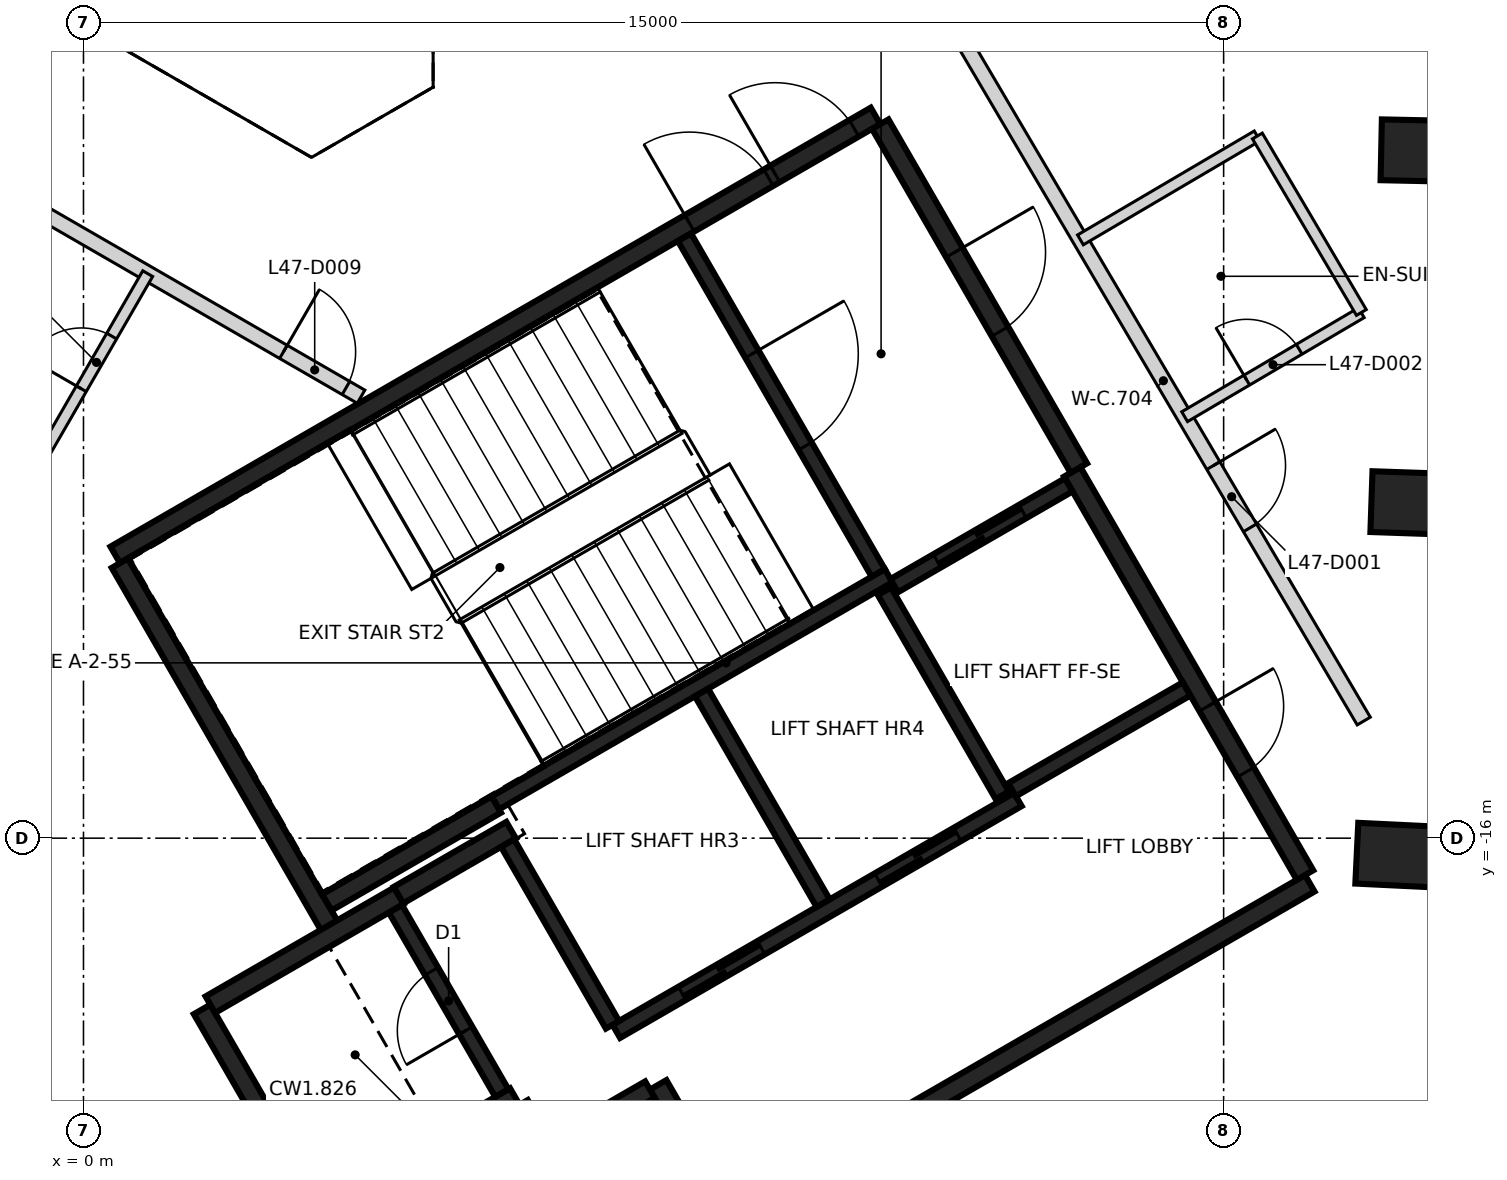
"""IFC4 building model, lengths in metres.
Left out: names, types, materials, properties, quantities, classifications, styles, units other than length and angle.
Written with IfcOpenShell. Run it as: python <this file> out.ifc"""

import sys

from ifc_helpers import new_model, si_unit, direction, frame, frame_2d, origin, origin_2d, place, context, subcontext, project, spatial, rectangle, extrude, element, fill, save


model = new_model("IFC4")
c1 = context("Model", 3, precision=1e-05, world=origin(), true_north=direction((0.0, 1.0)))
c2 = subcontext(c1, "Body", "Model", "MODEL_VIEW")
j1 = project(units=[si_unit("LENGTHUNIT", "METRE"), si_unit("PLANEANGLEUNIT", "RADIAN")], contexts=[c1])
p1 = place(None, origin())
s1 = spatial("IfcSite", under=j1, at=p1, CompositionType="ELEMENT")
p2 = place(p1, origin())
s2 = spatial("IfcBuilding", under=s1, at=p2, CompositionType="ELEMENT")
p3 = place(p2, frame((0.0, 0.0, 190.0)))
s3 = spatial("IfcBuildingStorey", under=s2, at=p3, CompositionType="ELEMENT", Elevation=190.0)
for number, where, z_axis, x_axis in (
    (1, (17.326, -16.226, -0.35), (0.0, 0.0, 1.0), (-0.999, 0.048, 0.0)),
    (2, (17.519, -11.592, -0.35), (0.0, 0.0, 1.0), (-0.999, 0.034, 0.0)),
    (3, (17.648, -6.956, -0.35), (0.0, 0.0, 1.0), (-1.0, 0.021, 0.0)),
):
    element("IfcColumn", number, at=place(p3, frame(where, z_axis=z_axis, x_axis=x_axis)), inside=s3, PredefinedType="COLUMN", context=c2, shape_type="SweptSolid", body=[
        extrude(rectangle(XDim=1.15, YDim=0.8, at=origin_2d()), origin(), (0.0, 0.0, 1.0), 3.6),
    ])
p4 = place(p3, frame((0.417, -12.273, 0.0), z_axis=(0.0, 0.0, 1.0), x_axis=(0.866021906294, 0.500006057782, 0.0)))
e4 = element("IfcWall", 4, at=p4, inside=s3, PredefinedType="SHEAR", context=c2, shape_type="SweptSolid", body=[
    extrude(rectangle(XDim=11.55, YDim=0.25, at=frame_2d((5.775, 0.0))), origin(), (0.0, 0.0, 1.0), 3.25),
])
p5 = place(p4, frame((10.025, 0.0, 0.0)))
e5 = element("IfcOpeningElement", 5, at=p5, cuts=e4, PredefinedType="OPENING", context=c2, shape_type="SweptSolid", body=[
    extrude(rectangle(XDim=1.2, YDim=2.1, at=frame_2d((0.6, 1.05))), frame((0.0, 0.135, 0.0), z_axis=(0.0, -1.0, 0.0), x_axis=(1.0, 0.0, 0.0)), (0.0, 0.0, 1.0), 0.27),
])
p6 = place(p4, frame((8.725, 0.0, 0.0)))
e6 = element("IfcOpeningElement", 6, at=p6, cuts=e4, PredefinedType="OPENING", context=c2, shape_type="SweptSolid", body=[
    extrude(rectangle(XDim=1.2, YDim=2.1, at=frame_2d((0.6, 1.05))), frame((0.0, 0.135, 0.0), z_axis=(0.0, -1.0, 0.0), x_axis=(1.0, 0.0, 0.0)), (0.0, 0.0, 1.0), 0.27),
])
p7 = place(p3, frame((16.133, -16.594, 0.0), z_axis=(0.0, 0.0, 1.0), x_axis=(-0.866022959057, -0.500004234368, 0.0)))
e7 = element("IfcWall", 7, at=p7, inside=s3, PredefinedType="SHEAR", context=c2, shape_type="SweptSolid", body=[
    extrude(rectangle(XDim=8.75, YDim=0.25, at=frame_2d((4.375, 0.0))), origin(), (0.0, 0.0, 1.0), 3.25),
])
p8 = place(p3, frame((13.008, -11.181, 0.0), z_axis=(0.0, 0.0, 1.0), x_axis=(0.500001955336, -0.866024274868, 0.0)))
e8 = element("IfcWall", 8, at=p8, inside=s3, PredefinedType="SHEAR", context=c2, shape_type="SweptSolid", body=[
    extrude(rectangle(XDim=6.125, YDim=0.25, at=frame_2d((3.062, 0.0))), origin(), (0.0, 0.0, 1.0), 3.25),
])
p9 = place(p8, frame((3.563, 0.0, 0.0)))
e9 = element("IfcOpeningElement", 9, at=p9, cuts=e8, PredefinedType="OPENING", context=c2, shape_type="SweptSolid", body=[
    extrude(rectangle(XDim=1.0, YDim=2.1, at=frame_2d((0.5, 1.05))), frame((0.0, 0.135, 0.0), z_axis=(0.0, -1.0, 0.0), x_axis=(1.0, 0.0, 0.0)), (0.0, 0.0, 1.0), 0.27),
])
p10 = place(p3, frame((3.235, -17.153, 0.0), z_axis=(0.0, 0.0, 1.0), x_axis=(-0.500008851346, 0.866020293397, 0.0)))
e10 = element("IfcWall", 10, at=p10, inside=s3, PredefinedType="SHEAR", context=c2, shape_type="SweptSolid", body=[
    extrude(rectangle(XDim=5.51, YDim=0.25, at=frame_2d((2.755, 0.0))), origin(), (0.0, 0.0, 1.0), 3.25),
])
p11 = place(p3, frame((10.483, -6.606, 0.0), z_axis=(0.0, 0.0, 1.0), x_axis=(0.49999885962, -0.866026062182, 0.0)))
e11 = element("IfcWall", 11, at=p11, inside=s3, PredefinedType="SHEAR", context=c2, shape_type="SweptSolid", body=[
    extrude(rectangle(XDim=5.225, YDim=0.25, at=frame_2d((2.612, 0.0))), origin(), (0.0, 0.0, 1.0), 3.25),
])
p12 = place(p11, frame((1.95, 0.0, 0.0)))
e12 = element("IfcOpeningElement", 12, at=p12, cuts=e11, PredefinedType="OPENING", context=c2, shape_type="SweptSolid", body=[
    extrude(rectangle(XDim=1.2, YDim=2.1, at=frame_2d((0.6, 1.05))), frame((0.0, 0.135, 0.0), z_axis=(0.0, -1.0, 0.0), x_axis=(1.0, 0.0, 0.0)), (0.0, 0.0, 1.0), 0.27),
])
p13 = place(p3, frame((3.085, -20.894, 0.0), z_axis=(0.0, 0.0, 1.0), x_axis=(-0.499978833458, 0.866037623948, 0.0)))
e13 = element("IfcWall", 13, at=p13, inside=s3, PredefinedType="SHEAR", context=c2, shape_type="SweptSolid", body=[
    extrude(rectangle(XDim=3.05, YDim=0.25, at=frame_2d((1.525, 0.0))), origin(), (0.0, 0.0, 1.0), 3.25),
])
p14 = place(p3, frame((1.669, -18.19, 0.0), z_axis=(0.0, 0.0, 1.0), x_axis=(0.866042235819, 0.499970844928, 0.0)))
e14 = element("IfcWall", 14, at=p14, inside=s3, PredefinedType="SHEAR", context=c2, shape_type="SweptSolid", body=[
    extrude(rectangle(XDim=2.865, YDim=0.25, at=frame_2d((1.432, 0.0))), origin(), (0.0, 0.0, 1.0), 3.25),
])
p15 = place(p3, frame((5.675, -19.399, 0.0), z_axis=(0.0, 0.0, 1.0), x_axis=(-0.866026637627, -0.499997862916, 0.0)))
e15 = element("IfcWall", 15, at=p15, inside=s3, PredefinedType="SHEAR", context=c2, shape_type="SweptSolid", body=[
    extrude(rectangle(XDim=2.865, YDim=0.25, at=frame_2d((1.432, 0.0))), origin(), (0.0, 0.0, 1.0), 3.25),
])
p16 = place(p3, frame((5.431, -15.556, 0.0), z_axis=(0.0, 0.0, 1.0), x_axis=(-0.866022940537, -0.500004266446, 0.0)))
e16 = element("IfcWall", 16, at=p16, inside=s3, PredefinedType="SHEAR", context=c2, shape_type="SweptSolid", body=[
    extrude(rectangle(XDim=2.575, YDim=0.25, at=frame_2d((1.287, 0.0))), origin(), (0.0, 0.0, 1.0), 3.25),
])
p17 = place(p3, frame((8.493, -20.86, 0.0), z_axis=(0.0, 0.0, 1.0), x_axis=(-0.500039802285, 0.866002422705, 0.0)))
e17 = element("IfcWall", 17, at=p17, inside=s3, PredefinedType="SHEAR", context=c2, shape_type="SweptSolid", body=[
    extrude(rectangle(XDim=1.865, YDim=0.25, at=frame_2d((0.932, 0.0))), origin(), (0.0, 0.0, 1.0), 3.25),
])
p18 = place(p3, frame((4.145, -16.749, 0.0), z_axis=(0.0, 0.0, 1.0), x_axis=(0.866038183914, 0.499977863513, 0.0)))
e18 = element("IfcWall", 18, at=p18, inside=s3, PredefinedType="SHEAR", context=c2, shape_type="SweptSolid", body=[
    extrude(rectangle(XDim=1.71, YDim=0.25, at=frame_2d((0.855, 0.0))), origin(), (0.0, 0.0, 1.0), 3.25),
])
p19 = place(p3, frame((7.452, -19.308, 0.0), z_axis=(0.0, 0.0, 1.0), x_axis=(-0.866044474677, -0.49996696679, 0.0)))
e19 = element("IfcWall", 19, at=p19, inside=s3, PredefinedType="SHEAR", context=c2, shape_type="SweptSolid", body=[
    extrude(rectangle(XDim=1.584, YDim=0.25, at=frame_2d((0.792, 0.0))), origin(), (0.0, 0.0, 1.0), 3.25),
])
p20 = place(p3, frame((6.017, -19.992, 0.0), z_axis=(0.0, 0.0, 1.0), x_axis=(-0.500364886717, 0.865814633822, 0.0)))
e20 = element("IfcWall", 20, at=p20, inside=s3, PredefinedType="SHEAR", context=c2, shape_type="SweptSolid", body=[
    extrude(rectangle(XDim=0.559, YDim=0.25, at=frame_2d((0.28, 0.0))), origin(), (0.0, 0.0, 1.0), 3.25),
])
p21 = place(p3, frame((5.419, -15.534, 0.0), z_axis=(0.0, 0.0, 1.0), x_axis=(0.866029065029, 0.499993658486, 0.0)))
e21 = element("IfcWall", 21, at=p21, inside=s3, PredefinedType="SHEAR", context=c2, shape_type="SweptSolid", body=[
    extrude(rectangle(XDim=5.974, YDim=0.2, at=frame_2d((2.987, 0.0))), origin(), (0.0, 0.0, 1.0), 3.25),
])
p22 = place(p3, frame((7.01, -18.542, 0.0), z_axis=(0.0, 0.0, 1.0), x_axis=(0.866030299012, 0.499991521122, 0.0)))
e22 = element("IfcWall", 22, at=p22, inside=s3, PredefinedType="SHEAR", context=c2, shape_type="SweptSolid", body=[
    extrude(rectangle(XDim=6.1, YDim=0.2, at=frame_2d((3.05, 0.0))), origin(), (0.0, 0.0, 1.0), 3.25),
])
p23 = place(p22, frame((1.0, 0.0, 0.0)))
e23 = element("IfcOpeningElement", 23, at=p23, cuts=e22, PredefinedType="OPENING", context=c2, shape_type="SweptSolid", body=[
    extrude(rectangle(XDim=1.2, YDim=2.1, at=frame_2d((0.6, 1.05))), frame((0.0, 0.11, 0.0), z_axis=(0.0, -1.0, 0.0), x_axis=(1.0, 0.0, 0.0)), (0.0, 0.0, 1.0), 0.22),
])
p24 = place(p22, frame((3.982, 0.0, 0.0)))
e24 = element("IfcOpeningElement", 24, at=p24, cuts=e22, PredefinedType="OPENING", context=c2, shape_type="SweptSolid", body=[
    extrude(rectangle(XDim=1.2, YDim=2.1, at=frame_2d((0.6, 1.05))), frame((0.0, 0.11, 0.0), z_axis=(0.0, -1.0, 0.0), x_axis=(1.0, 0.0, 0.0)), (0.0, 0.0, 1.0), 0.22),
])
p25 = place(p3, frame((7.906, -8.094, 0.0), z_axis=(0.0, 0.0, 1.0), x_axis=(0.500027839223, -0.866009330205, 0.0)))
e25 = element("IfcWall", 25, at=p25, inside=s3, PredefinedType="SHEAR", context=c2, shape_type="SweptSolid", body=[
    extrude(rectangle(XDim=5.098, YDim=0.2, at=frame_2d((2.549, 0.0))), origin(), (0.0, 0.0, 1.0), 3.25),
])
p26 = place(p25, frame((1.774, 0.0, 0.0)))
e26 = element("IfcOpeningElement", 26, at=p26, cuts=e25, PredefinedType="OPENING", context=c2, shape_type="SweptSolid", body=[
    extrude(rectangle(XDim=1.4, YDim=2.1, at=frame_2d((0.7, 1.05))), frame((0.0, 0.11, 0.0), z_axis=(0.0, -1.0, 0.0), x_axis=(1.0, 0.0, 0.0)), (0.0, 0.0, 1.0), 0.22),
])
p27 = place(p3, frame((8.132, -14.084, 0.0), z_axis=(0.0, 0.0, 1.0), x_axis=(0.499997778408, -0.866026686418, 0.0)))
e27 = element("IfcWall", 27, at=p27, inside=s3, PredefinedType="SHEAR", context=c2, shape_type="SweptSolid", body=[
    extrude(rectangle(XDim=3.198, YDim=0.2, at=frame_2d((1.599, 0.0))), origin(), (0.0, 0.0, 1.0), 3.25),
])
p28 = place(p3, frame((5.503, -19.352, 0.0), z_axis=(0.0, 0.0, 1.0), x_axis=(-0.499986818241, 0.866033014143, 0.0)))
e28 = element("IfcWall", 28, at=p28, inside=s3, PredefinedType="SHEAR", context=c2, shape_type="SweptSolid", body=[
    extrude(rectangle(XDim=2.798, YDim=0.2, at=frame_2d((1.399, 0.0))), origin(), (0.0, 0.0, 1.0), 3.25),
])
p29 = place(p28, frame((0.949, 0.0, 0.0)))
e29 = element("IfcOpeningElement", 29, at=p29, cuts=e28, PredefinedType="OPENING", context=c2, shape_type="SweptSolid", body=[
    extrude(rectangle(XDim=0.9, YDim=2.1, at=frame_2d((0.45, 1.05))), frame((0.0, 0.11, 0.0), z_axis=(0.0, -1.0, 0.0), x_axis=(1.0, 0.0, 0.0)), (0.0, 0.0, 1.0), 0.22),
])
p30 = place(p3, frame((6.96, -18.455, 0.0), z_axis=(0.0, 0.0, 1.0), x_axis=(-0.499926705758, 0.866067716099, 0.0)))
e30 = element("IfcWall", 30, at=p30, inside=s3, PredefinedType="SHEAR", context=c2, shape_type="SweptSolid", body=[
    extrude(rectangle(XDim=2.759, YDim=0.2, at=frame_2d((1.38, 0.0))), origin(), (0.0, 0.0, 1.0), 3.25),
])
p31 = place(p3, frame((12.088, -15.437, 0.0), z_axis=(0.0, 0.0, 1.0), x_axis=(-0.500026960575, 0.86600983753, 0.0)))
e31 = element("IfcWall", 31, at=p31, inside=s3, PredefinedType="SHEAR", context=c2, shape_type="SweptSolid", body=[
    extrude(rectangle(XDim=3.1, YDim=0.2, at=frame_2d((1.55, 0.0))), origin(), (0.0, 0.0, 1.0), 3.25),
])
p32 = place(p3, frame((10.666, -12.678, 0.0), z_axis=(0.0, 0.0, 1.0), x_axis=(0.866018407898, 0.500012117035, 0.0)))
e32 = element("IfcWall", 32, at=p32, inside=s3, PredefinedType="SHEAR", context=c2, shape_type="SweptSolid", body=[
    extrude(rectangle(XDim=2.651, YDim=0.2, at=frame_2d((1.325, 0.0))), origin(), (0.0, 0.0, 1.0), 3.25),
])
p33 = place(p32, frame((0.652, 0.0, 0.0)))
e33 = element("IfcOpeningElement", 33, at=p33, cuts=e32, PredefinedType="OPENING", context=c2, shape_type="SweptSolid", body=[
    extrude(rectangle(XDim=1.3, YDim=2.1, at=frame_2d((0.65, 1.05))), frame((0.0, 0.11, 0.0), z_axis=(0.0, -1.0, 0.0), x_axis=(1.0, 0.0, 0.0)), (0.0, 0.0, 1.0), 0.22),
])
p34 = place(p3, frame((14.512, -14.037, 0.0), z_axis=(0.0, 0.0, 1.0), x_axis=(-0.866018407898, -0.500012117035, 0.0)))
e34 = element("IfcWall", 34, at=p34, inside=s3, PredefinedType="SHEAR", context=c2, shape_type="SweptSolid", body=[
    extrude(rectangle(XDim=2.651, YDim=0.2, at=frame_2d((1.325, 0.0))), origin(), (0.0, 0.0, 1.0), 3.25),
])
p35 = place(p3, frame((-7.589, -3.702, 0.0), z_axis=(0.0, 0.0, 1.0), x_axis=(0.86602490244, -0.500000868353, 0.0)))
e35 = element("IfcWall", 35, at=p35, inside=s3, PredefinedType="PARTITIONING", context=c2, shape_type="SweptSolid", body=[
    extrude(rectangle(XDim=12.98, YDim=0.2, at=frame_2d((6.49, 0.0))), origin(), (0.0, 0.0, 1.0), 3.25),
])
p36 = place(p35, frame((11.8, 0.0, 0.0)))
e36 = element("IfcOpeningElement", 36, at=p36, cuts=e35, PredefinedType="OPENING", context=c2, shape_type="SweptSolid", body=[
    extrude(rectangle(XDim=0.95, YDim=2.1, at=frame_2d((0.475, 1.05))), frame((0.0, 0.11, 0.0), z_axis=(0.0, -1.0, 0.0), x_axis=(1.0, 0.0, 0.0)), (0.0, 0.0, 1.0), 0.22),
])
p37 = place(p3, frame((11.571, -5.505, 0.0), z_axis=(0.0, 0.0, 1.0), x_axis=(0.507402039651, -0.861709446483, 0.0)))
e37 = element("IfcWall", 37, at=p37, inside=s3, PredefinedType="PARTITIONING", context=c2, shape_type="SweptSolid", body=[
    extrude(rectangle(XDim=10.391, YDim=0.2, at=frame_2d((5.196, 0.0))), origin(), (0.0, 0.0, 1.0), 3.25),
])
p38 = place(p37, frame((6.491, 0.0, 0.0)))
e38 = element("IfcOpeningElement", 38, at=p38, cuts=e37, PredefinedType="OPENING", context=c2, shape_type="SweptSolid", body=[
    extrude(rectangle(XDim=0.95, YDim=2.1, at=frame_2d((0.475, 1.05))), frame((0.0, 0.11, 0.0), z_axis=(0.0, -1.0, 0.0), x_axis=(1.0, 0.0, 0.0)), (0.0, 0.0, 1.0), 0.22),
])
p39 = place(p3, frame((-0.502, -10.908, 0.0), z_axis=(0.0, 0.0, 1.0), x_axis=(0.499675408556, 0.866212725654, 0.0)))
e39 = element("IfcWall", 39, at=p39, inside=s3, PredefinedType="PARTITIONING", context=c2, shape_type="SweptSolid", body=[
    extrude(rectangle(XDim=2.696, YDim=0.15, at=frame_2d((1.348, 0.0))), origin(), (0.0, 0.0, 1.0), 3.25),
])
p40 = place(p39, frame((0.948, 0.0, 0.0)))
e40 = element("IfcOpeningElement", 40, at=p40, cuts=e39, PredefinedType="OPENING", context=c2, shape_type="SweptSolid", body=[
    extrude(rectangle(XDim=0.8, YDim=2.1, at=frame_2d((0.4, 1.05))), frame((0.0, 0.085, 0.0), z_axis=(0.0, -1.0, 0.0), x_axis=(1.0, 0.0, 0.0)), (0.0, 0.0, 1.0), 0.17),
])
p41 = place(p3, frame((13.116, -8.129, 0.0), z_axis=(0.0, 0.0, 1.0), x_axis=(0.861885352062, 0.507103184669, 0.0)))
e41 = element("IfcWall", 41, at=p41, inside=s3, PredefinedType="PARTITIONING", context=c2, shape_type="SweptSolid", body=[
    extrude(rectangle(XDim=2.698, YDim=0.15, at=frame_2d((1.349, 0.0))), origin(), (0.0, 0.0, 1.0), 3.25),
])
p42 = place(p3, frame((14.487, -10.455, 0.0), z_axis=(0.0, 0.0, 1.0), x_axis=(0.861752634979, 0.507328686461, 0.0)))
e42 = element("IfcWall", 42, at=p42, inside=s3, PredefinedType="PARTITIONING", context=c2, shape_type="SweptSolid", body=[
    extrude(rectangle(XDim=2.697, YDim=0.15, at=frame_2d((1.348, 0.0))), origin(), (0.0, 0.0, 1.0), 3.25),
])
p43 = place(p42, frame((0.948, 0.0, 0.0)))
e43 = element("IfcOpeningElement", 43, at=p43, cuts=e42, PredefinedType="OPENING", context=c2, shape_type="SweptSolid", body=[
    extrude(rectangle(XDim=0.8, YDim=2.1, at=frame_2d((0.4, 1.05))), frame((0.0, 0.085, 0.0), z_axis=(0.0, -1.0, 0.0), x_axis=(1.0, 0.0, 0.0)), (0.0, 0.0, 1.0), 0.17),
])
p44 = place(p3, frame((15.444, -6.762, 0.0), z_axis=(0.0, 0.0, 1.0), x_axis=(0.507578234334, -0.861605673165, 0.0)))
e44 = element("IfcWall", 44, at=p44, inside=s3, PredefinedType="PARTITIONING", context=c2, shape_type="SweptSolid", body=[
    extrude(rectangle(XDim=2.695, YDim=0.15, at=frame_2d((1.348, 0.0))), origin(), (0.0, 0.0, 1.0), 3.25),
])
p45 = place(p33, origin())
e45 = element("IfcDoor", 45, at=p45, inside=s3, OperationType="SLIDING_TO_LEFT", PredefinedType="DOOR", context=c2, shape_type="SweptSolid", body=[
    extrude(rectangle(XDim=1.3, YDim=2.1, at=frame_2d((0.65, 1.05))), frame((0.0, 0.025, 0.0), z_axis=(0.0, -1.0, 0.0), x_axis=(1.0, 0.0, 0.0)), (0.0, 0.0, 1.0), 0.05),
])
fill(e33, e45)
p46 = place(p23, origin())
e46 = element("IfcDoor", 46, at=p46, inside=s3, OperationType="DOUBLE_DOOR_SLIDING", PredefinedType="DOOR", context=c2, shape_type="SweptSolid", body=[
    extrude(rectangle(XDim=1.2, YDim=2.1, at=frame_2d((0.6, 1.05))), frame((0.0, 0.025, 0.0), z_axis=(0.0, -1.0, 0.0), x_axis=(1.0, 0.0, 0.0)), (0.0, 0.0, 1.0), 0.05),
])
fill(e23, e46)
p47 = place(p24, origin())
e47 = element("IfcDoor", 47, at=p47, inside=s3, OperationType="DOUBLE_DOOR_SLIDING", PredefinedType="DOOR", context=c2, shape_type="SweptSolid", body=[
    extrude(rectangle(XDim=1.2, YDim=2.1, at=frame_2d((0.6, 1.05))), frame((0.0, 0.025, 0.0), z_axis=(0.0, -1.0, 0.0), x_axis=(1.0, 0.0, 0.0)), (0.0, 0.0, 1.0), 0.05),
])
fill(e24, e47)
p48 = place(p9, origin())
e48 = element("IfcDoor", 48, at=p48, inside=s3, OperationType="SINGLE_SWING_LEFT", PredefinedType="DOOR", context=c2, shape_type="SweptSolid", body=[
    extrude(rectangle(XDim=1.0, YDim=2.1, at=frame_2d((0.5, 1.05))), frame((0.0, 0.025, 0.0), z_axis=(0.0, -1.0, 0.0), x_axis=(1.0, 0.0, 0.0)), (0.0, 0.0, 1.0), 0.05),
])
fill(e9, e48)
p49 = place(p5, origin())
e49 = element("IfcDoor", 49, at=p49, inside=s3, OperationType="SINGLE_SWING_LEFT", PredefinedType="DOOR", context=c2, shape_type="SweptSolid", body=[
    extrude(rectangle(XDim=1.2, YDim=2.1, at=frame_2d((0.6, 1.05))), frame((0.0, 0.025, 0.0), z_axis=(0.0, -1.0, 0.0), x_axis=(1.0, 0.0, 0.0)), (0.0, 0.0, 1.0), 0.05),
])
fill(e5, e49)
p50 = place(p6, origin())
e50 = element("IfcDoor", 50, at=p50, inside=s3, OperationType="SINGLE_SWING_RIGHT", PredefinedType="DOOR", context=c2, shape_type="SweptSolid", body=[
    extrude(rectangle(XDim=1.2, YDim=2.1, at=frame_2d((0.6, 1.05))), frame((0.0, 0.025, 0.0), z_axis=(0.0, -1.0, 0.0), x_axis=(1.0, 0.0, 0.0)), (0.0, 0.0, 1.0), 0.05),
])
fill(e6, e50)
p51 = place(p26, origin())
e51 = element("IfcDoor", 51, at=p51, inside=s3, OperationType="SINGLE_SWING_LEFT", PredefinedType="DOOR", context=c2, shape_type="SweptSolid", body=[
    extrude(rectangle(XDim=1.4, YDim=2.1, at=frame_2d((0.7, 1.05))), frame((0.0, 0.025, 0.0), z_axis=(0.0, -1.0, 0.0), x_axis=(1.0, 0.0, 0.0)), (0.0, 0.0, 1.0), 0.05),
])
fill(e26, e51)
p52 = place(p29, origin())
e52 = element("IfcDoor", 52, at=p52, inside=s3, OperationType="SINGLE_SWING_RIGHT", PredefinedType="DOOR", context=c2, shape_type="SweptSolid", body=[
    extrude(rectangle(XDim=0.9, YDim=2.1, at=frame_2d((0.45, 1.05))), frame((0.0, 0.025, 0.0), z_axis=(0.0, -1.0, 0.0), x_axis=(1.0, 0.0, 0.0)), (0.0, 0.0, 1.0), 0.05),
])
fill(e29, e52)
p53 = place(p12, origin())
e53 = element("IfcDoor", 53, at=p53, inside=s3, OperationType="SINGLE_SWING_RIGHT", PredefinedType="DOOR", context=c2, shape_type="SweptSolid", body=[
    extrude(rectangle(XDim=1.2, YDim=2.1, at=frame_2d((0.6, 1.05))), frame((0.0, 0.025, 0.0), z_axis=(0.0, -1.0, 0.0), x_axis=(1.0, 0.0, 0.0)), (0.0, 0.0, 1.0), 0.05),
])
fill(e12, e53)
p54 = place(p38, origin())
e54 = element("IfcDoor", 54, at=p54, inside=s3, OperationType="SINGLE_SWING_LEFT", PredefinedType="DOOR", context=c2, shape_type="SweptSolid", body=[
    extrude(rectangle(XDim=0.95, YDim=2.1, at=frame_2d((0.475, 1.05))), frame((0.0, 0.025, 0.0), z_axis=(0.0, -1.0, 0.0), x_axis=(1.0, 0.0, 0.0)), (0.0, 0.0, 1.0), 0.05),
])
fill(e38, e54)
p55 = place(p43, frame((0.8, 0.0, 0.0), z_axis=(0.0, 0.0, 1.0), x_axis=(-1.0, 0.0, 0.0)))
e55 = element("IfcDoor", 55, at=p55, inside=s3, OperationType="SINGLE_SWING_LEFT", PredefinedType="DOOR", context=c2, shape_type="SweptSolid", body=[
    extrude(rectangle(XDim=0.8, YDim=2.1, at=frame_2d((0.4, 1.05))), frame((0.0, 0.025, 0.0), z_axis=(0.0, -1.0, 0.0), x_axis=(1.0, 0.0, 0.0)), (0.0, 0.0, 1.0), 0.05),
])
fill(e43, e55)
p56 = place(p36, frame((0.95, 0.0, 0.0), z_axis=(0.0, 0.0, 1.0), x_axis=(-1.0, 0.0, 0.0)))
e56 = element("IfcDoor", 56, at=p56, inside=s3, OperationType="SINGLE_SWING_LEFT", PredefinedType="DOOR", context=c2, shape_type="SweptSolid", body=[
    extrude(rectangle(XDim=0.95, YDim=2.1, at=frame_2d((0.475, 1.05))), frame((0.0, 0.025, 0.0), z_axis=(0.0, -1.0, 0.0), x_axis=(1.0, 0.0, 0.0)), (0.0, 0.0, 1.0), 0.05),
])
fill(e36, e56)
p57 = place(p40, frame((0.8, 0.0, 0.0), z_axis=(0.0, 0.0, 1.0), x_axis=(-1.0, 0.0, 0.0)))
e57 = element("IfcDoor", 57, at=p57, inside=s3, OperationType="SINGLE_SWING_LEFT", PredefinedType="DOOR", context=c2, shape_type="SweptSolid", body=[
    extrude(rectangle(XDim=0.8, YDim=2.1, at=frame_2d((0.4, 1.05))), frame((0.0, 0.025, 0.0), z_axis=(0.0, -1.0, 0.0), x_axis=(1.0, 0.0, 0.0)), (0.0, 0.0, 1.0), 0.05),
])
fill(e40, e57)
save(model, sys.argv[1])
